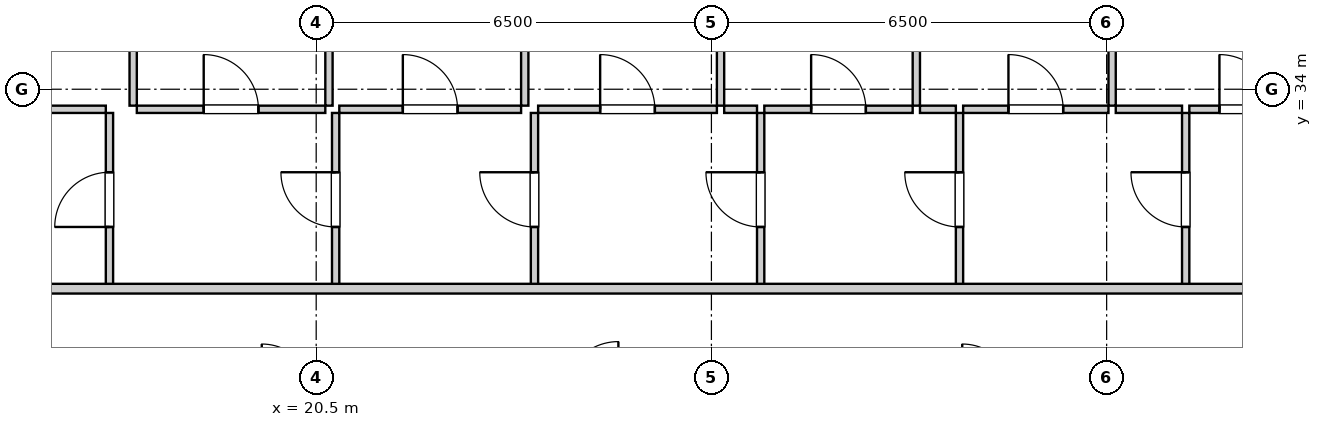
"""IFC4 building model, lengths in metres.
Left out: names, types, materials, properties, quantities, classifications, styles, units other than length and angle.
Written with IfcOpenShell. Run it as: python <this file> out.ifc"""

import sys

from ifc_helpers import new_model, si_unit, direction, frame, frame_2d, origin, place, context, subcontext, project, spatial, rectangle, extrude, element, fill, save


model = new_model("IFC4")
c1 = context("Model", 3, precision=1e-05, world=origin(), true_north=direction((0.0, 1.0)))
c2 = subcontext(c1, "Body", "Model", "MODEL_VIEW")
j1 = project(units=[si_unit("LENGTHUNIT", "METRE"), si_unit("PLANEANGLEUNIT", "RADIAN")], contexts=[c1])
p1 = place(None, origin())
s1 = spatial("IfcSite", under=j1, at=p1, CompositionType="ELEMENT")
p2 = place(p1, origin())
s2 = spatial("IfcBuilding", under=s1, at=p2, CompositionType="ELEMENT")
p3 = place(p2, frame((0.0, 0.0, 100.7)))
s3 = spatial("IfcBuildingStorey", under=s2, at=p3, CompositionType="ELEMENT", Elevation=100.7)
p4 = place(p3, frame((17.1, 30.76, 0.0), z_axis=(0.0, 0.0, 1.0), x_axis=(0.0, 1.0, 0.0)))
e1 = element("IfcWall", 1, at=p4, inside=s3, PredefinedType="PARTITIONING", context=c2, shape_type="SweptSolid", body=[
    extrude(rectangle(XDim=2.85, YDim=0.12, at=frame_2d((1.425, 0.0))), origin(), (0.0, 0.0, 1.0), 2.94),
])
p5 = place(p4, frame((0.975, 0.0, 0.0)))
e2 = element("IfcOpeningElement", 2, at=p5, cuts=e1, PredefinedType="OPENING", context=c2, shape_type="SweptSolid", body=[
    extrude(rectangle(XDim=0.9, YDim=2.05, at=frame_2d((0.45, 1.025))), frame((0.0, 0.07, 0.0), z_axis=(0.0, -1.0, 0.0), x_axis=(1.0, 0.0, 0.0)), (0.0, 0.0, 1.0), 0.14),
])
p6 = place(p3, frame((14.33, 33.67, 0.0), z_axis=(0.0, 0.0, 1.0), x_axis=(1.0, 0.0, 0.0)))
e3 = element("IfcWall", 3, at=p6, inside=s3, PredefinedType="PARTITIONING", context=c2, shape_type="SweptSolid", body=[
    extrude(rectangle(XDim=2.71, YDim=0.12, at=frame_2d((1.355, 0.0))), origin(), (0.0, 0.0, 1.0), 2.94),
])
p7 = place(p6, frame((0.905, 0.0, 0.0)))
e4 = element("IfcOpeningElement", 4, at=p7, cuts=e3, PredefinedType="OPENING", context=c2, shape_type="SweptSolid", body=[
    extrude(rectangle(XDim=0.9, YDim=2.05, at=frame_2d((0.45, 1.025))), frame((0.0, 0.07, 0.0), z_axis=(0.0, -1.0, 0.0), x_axis=(1.0, 0.0, 0.0)), (0.0, 0.0, 1.0), 0.14),
])
p8 = place(p3, frame((20.82, 30.76, 0.0), z_axis=(0.0, 0.0, 1.0), x_axis=(0.0, 1.0, 0.0)))
e5 = element("IfcWall", 5, at=p8, inside=s3, PredefinedType="PARTITIONING", context=c2, shape_type="SweptSolid", body=[
    extrude(rectangle(XDim=2.85, YDim=0.12, at=frame_2d((1.425, 0.0))), origin(), (0.0, 0.0, 1.0), 2.94),
])
p9 = place(p8, frame((0.975, 0.0, 0.0)))
e6 = element("IfcOpeningElement", 6, at=p9, cuts=e5, PredefinedType="OPENING", context=c2, shape_type="SweptSolid", body=[
    extrude(rectangle(XDim=0.9, YDim=2.05, at=frame_2d((0.45, 1.025))), frame((0.0, 0.07, 0.0), z_axis=(0.0, -1.0, 0.0), x_axis=(1.0, 0.0, 0.0)), (0.0, 0.0, 1.0), 0.14),
])
p10 = place(p3, frame((17.55, 33.67, 0.0), z_axis=(0.0, 0.0, 1.0), x_axis=(1.0, 0.0, 0.0)))
e7 = element("IfcWall", 7, at=p10, inside=s3, PredefinedType="PARTITIONING", context=c2, shape_type="SweptSolid", body=[
    extrude(rectangle(XDim=3.1, YDim=0.12, at=frame_2d((1.55, 0.0))), origin(), (0.0, 0.0, 1.0), 2.94),
])
p11 = place(p10, frame((1.1, 0.0, 0.0)))
e8 = element("IfcOpeningElement", 8, at=p11, cuts=e7, PredefinedType="OPENING", context=c2, shape_type="SweptSolid", body=[
    extrude(rectangle(XDim=0.9, YDim=2.05, at=frame_2d((0.45, 1.025))), frame((0.0, 0.07, 0.0), z_axis=(0.0, -1.0, 0.0), x_axis=(1.0, 0.0, 0.0)), (0.0, 0.0, 1.0), 0.14),
])
p12 = place(p3, frame((24.09, 30.76, 0.0), z_axis=(0.0, 0.0, 1.0), x_axis=(0.0, 1.0, 0.0)))
e9 = element("IfcWall", 9, at=p12, inside=s3, PredefinedType="PARTITIONING", context=c2, shape_type="SweptSolid", body=[
    extrude(rectangle(XDim=2.85, YDim=0.12, at=frame_2d((1.425, 0.0))), origin(), (0.0, 0.0, 1.0), 2.94),
])
p13 = place(p12, frame((0.975, 0.0, 0.0)))
e10 = element("IfcOpeningElement", 10, at=p13, cuts=e9, PredefinedType="OPENING", context=c2, shape_type="SweptSolid", body=[
    extrude(rectangle(XDim=0.9, YDim=2.05, at=frame_2d((0.45, 1.025))), frame((0.0, 0.07, 0.0), z_axis=(0.0, -1.0, 0.0), x_axis=(1.0, 0.0, 0.0)), (0.0, 0.0, 1.0), 0.14),
])
p14 = place(p3, frame((20.88, 33.67, 0.0), z_axis=(0.0, 0.0, 1.0), x_axis=(1.0, 0.0, 0.0)))
e11 = element("IfcWall", 11, at=p14, inside=s3, PredefinedType="PARTITIONING", context=c2, shape_type="SweptSolid", body=[
    extrude(rectangle(XDim=2.99, YDim=0.12, at=frame_2d((1.495, 0.0))), origin(), (0.0, 0.0, 1.0), 2.94),
])
p15 = place(p14, frame((1.045, 0.0, 0.0)))
e12 = element("IfcOpeningElement", 12, at=p15, cuts=e11, PredefinedType="OPENING", context=c2, shape_type="SweptSolid", body=[
    extrude(rectangle(XDim=0.9, YDim=2.05, at=frame_2d((0.45, 1.025))), frame((0.0, 0.07, 0.0), z_axis=(0.0, -1.0, 0.0), x_axis=(1.0, 0.0, 0.0)), (0.0, 0.0, 1.0), 0.14),
])
p16 = place(p3, frame((27.81, 30.76, 0.0), z_axis=(0.0, 0.0, 1.0), x_axis=(0.0, 1.0, 0.0)))
e13 = element("IfcWall", 13, at=p16, inside=s3, PredefinedType="PARTITIONING", context=c2, shape_type="SweptSolid", body=[
    extrude(rectangle(XDim=2.85, YDim=0.12, at=frame_2d((1.425, 0.0))), origin(), (0.0, 0.0, 1.0), 2.94),
])
p17 = place(p16, frame((0.975, 0.0, 0.0)))
e14 = element("IfcOpeningElement", 14, at=p17, cuts=e13, PredefinedType="OPENING", context=c2, shape_type="SweptSolid", body=[
    extrude(rectangle(XDim=0.9, YDim=2.05, at=frame_2d((0.45, 1.025))), frame((0.0, 0.07, 0.0), z_axis=(0.0, -1.0, 0.0), x_axis=(1.0, 0.0, 0.0)), (0.0, 0.0, 1.0), 0.14),
])
p18 = place(p3, frame((24.15, 33.67, 0.0), z_axis=(0.0, 0.0, 1.0), x_axis=(1.0, 0.0, 0.0)))
e15 = element("IfcWall", 15, at=p18, inside=s3, PredefinedType="PARTITIONING", context=c2, shape_type="SweptSolid", body=[
    extrude(rectangle(XDim=2.94, YDim=0.12, at=frame_2d((1.47, 0.0))), origin(), (0.0, 0.0, 1.0), 2.94),
])
p19 = place(p18, frame((1.02, 0.0, 0.0)))
e16 = element("IfcOpeningElement", 16, at=p19, cuts=e15, PredefinedType="OPENING", context=c2, shape_type="SweptSolid", body=[
    extrude(rectangle(XDim=0.9, YDim=2.05, at=frame_2d((0.45, 1.025))), frame((0.0, 0.07, 0.0), z_axis=(0.0, -1.0, 0.0), x_axis=(1.0, 0.0, 0.0)), (0.0, 0.0, 1.0), 0.14),
])
p20 = place(p3, frame((27.21, 33.67, 0.0), z_axis=(0.0, 0.0, 1.0), x_axis=(1.0, 0.0, 0.0)))
e17 = element("IfcWall", 17, at=p20, inside=s3, PredefinedType="PARTITIONING", context=c2, shape_type="SweptSolid", body=[
    extrude(rectangle(XDim=0.54, YDim=0.12, at=frame_2d((0.27, 0.0))), origin(), (0.0, 0.0, 1.0), 2.94),
])
p21 = place(p3, frame((31.08, 30.76, 0.0), z_axis=(0.0, 0.0, 1.0), x_axis=(0.0, 1.0, 0.0)))
e18 = element("IfcWall", 18, at=p21, inside=s3, PredefinedType="PARTITIONING", context=c2, shape_type="SweptSolid", body=[
    extrude(rectangle(XDim=2.85, YDim=0.12, at=frame_2d((1.425, 0.0))), origin(), (0.0, 0.0, 1.0), 2.94),
])
p22 = place(p21, frame((0.975, 0.0, 0.0)))
e19 = element("IfcOpeningElement", 19, at=p22, cuts=e18, PredefinedType="OPENING", context=c2, shape_type="SweptSolid", body=[
    extrude(rectangle(XDim=0.9, YDim=2.05, at=frame_2d((0.45, 1.025))), frame((0.0, 0.07, 0.0), z_axis=(0.0, -1.0, 0.0), x_axis=(1.0, 0.0, 0.0)), (0.0, 0.0, 1.0), 0.14),
])
p23 = place(p3, frame((27.87, 33.67, 0.0), z_axis=(0.0, 0.0, 1.0), x_axis=(1.0, 0.0, 0.0)))
e20 = element("IfcWall", 20, at=p23, inside=s3, PredefinedType="PARTITIONING", context=c2, shape_type="SweptSolid", body=[
    extrude(rectangle(XDim=2.44, YDim=0.12, at=frame_2d((1.22, 0.0))), origin(), (0.0, 0.0, 1.0), 2.94),
])
p24 = place(p23, frame((0.77, 0.0, 0.0)))
e21 = element("IfcOpeningElement", 21, at=p24, cuts=e20, PredefinedType="OPENING", context=c2, shape_type="SweptSolid", body=[
    extrude(rectangle(XDim=0.9, YDim=2.05, at=frame_2d((0.45, 1.025))), frame((0.0, 0.07, 0.0), z_axis=(0.0, -1.0, 0.0), x_axis=(1.0, 0.0, 0.0)), (0.0, 0.0, 1.0), 0.14),
])
p25 = place(p3, frame((30.43, 33.67, 0.0), z_axis=(0.0, 0.0, 1.0), x_axis=(1.0, 0.0, 0.0)))
e22 = element("IfcWall", 22, at=p25, inside=s3, PredefinedType="PARTITIONING", context=c2, shape_type="SweptSolid", body=[
    extrude(rectangle(XDim=0.59, YDim=0.12, at=frame_2d((0.295, 0.0))), origin(), (0.0, 0.0, 1.0), 2.94),
])
p26 = place(p3, frame((34.8, 30.76, 0.0), z_axis=(0.0, 0.0, 1.0), x_axis=(0.0, 1.0, 0.0)))
e23 = element("IfcWall", 23, at=p26, inside=s3, PredefinedType="PARTITIONING", context=c2, shape_type="SweptSolid", body=[
    extrude(rectangle(XDim=2.85, YDim=0.12, at=frame_2d((1.425, 0.0))), origin(), (0.0, 0.0, 1.0), 2.94),
])
p27 = place(p26, frame((0.975, 0.0, 0.0)))
e24 = element("IfcOpeningElement", 24, at=p27, cuts=e23, PredefinedType="OPENING", context=c2, shape_type="SweptSolid", body=[
    extrude(rectangle(XDim=0.9, YDim=2.05, at=frame_2d((0.45, 1.025))), frame((0.0, 0.07, 0.0), z_axis=(0.0, -1.0, 0.0), x_axis=(1.0, 0.0, 0.0)), (0.0, 0.0, 1.0), 0.14),
])
p28 = place(p3, frame((31.14, 33.67, 0.0), z_axis=(0.0, 0.0, 1.0), x_axis=(1.0, 0.0, 0.0)))
e25 = element("IfcWall", 25, at=p28, inside=s3, PredefinedType="PARTITIONING", context=c2, shape_type="SweptSolid", body=[
    extrude(rectangle(XDim=2.39, YDim=0.12, at=frame_2d((1.195, 0.0))), origin(), (0.0, 0.0, 1.0), 2.94),
])
p29 = place(p28, frame((0.745, 0.0, 0.0)))
e26 = element("IfcOpeningElement", 26, at=p29, cuts=e25, PredefinedType="OPENING", context=c2, shape_type="SweptSolid", body=[
    extrude(rectangle(XDim=0.9, YDim=2.05, at=frame_2d((0.45, 1.025))), frame((0.0, 0.07, 0.0), z_axis=(0.0, -1.0, 0.0), x_axis=(1.0, 0.0, 0.0)), (0.0, 0.0, 1.0), 0.14),
])
p30 = place(p3, frame((33.65, 33.67, 0.0), z_axis=(0.0, 0.0, 1.0), x_axis=(1.0, 0.0, 0.0)))
e27 = element("IfcWall", 27, at=p30, inside=s3, PredefinedType="PARTITIONING", context=c2, shape_type="SweptSolid", body=[
    extrude(rectangle(XDim=1.09, YDim=0.12, at=frame_2d((0.545, 0.0))), origin(), (0.0, 0.0, 1.0), 2.94),
])
p31 = place(p3, frame((34.86, 33.67, 0.0), z_axis=(0.0, 0.0, 1.0), x_axis=(1.0, 0.0, 0.0)))
e28 = element("IfcWall", 28, at=p31, inside=s3, PredefinedType="PARTITIONING", context=c2, shape_type="SweptSolid", body=[
    extrude(rectangle(XDim=1.89, YDim=0.12, at=frame_2d((0.945, 0.0))), origin(), (0.0, 0.0, 1.0), 2.94),
])
p32 = place(p31, frame((0.495, 0.0, 0.0)))
e29 = element("IfcOpeningElement", 29, at=p32, cuts=e28, PredefinedType="OPENING", context=c2, shape_type="SweptSolid", body=[
    extrude(rectangle(XDim=0.9, YDim=2.05, at=frame_2d((0.45, 1.025))), frame((0.0, 0.07, 0.0), z_axis=(0.0, -1.0, 0.0), x_axis=(1.0, 0.0, 0.0)), (0.0, 0.0, 1.0), 0.14),
])
p33 = place(p3, frame((17.49, 33.73, 0.0), z_axis=(0.0, 0.0, 1.0), x_axis=(0.0, 1.0, 0.0)))
e30 = element("IfcWall", 30, at=p33, inside=s3, PredefinedType="PARTITIONING", context=c2, shape_type="SweptSolid", body=[
    extrude(rectangle(XDim=9.29, YDim=0.12, at=frame_2d((4.645, 0.0))), origin(), (0.0, 0.0, 1.0), 2.94),
])
p34 = place(p33, frame((4.18, 0.0, 0.0)))
e31 = element("IfcOpeningElement", 31, at=p34, cuts=e30, PredefinedType="OPENING", context=c2, shape_type="SweptSolid", body=[
    extrude(rectangle(XDim=0.9, YDim=2.05, at=frame_2d((0.45, 1.025))), frame((0.0, 0.07, 0.0), z_axis=(0.0, -1.0, 0.0), x_axis=(1.0, 0.0, 0.0)), (0.0, 0.0, 1.0), 0.14),
])
p35 = place(p3, frame((20.71, 33.73, 0.0), z_axis=(0.0, 0.0, 1.0), x_axis=(0.0, 1.0, 0.0)))
e32 = element("IfcWall", 32, at=p35, inside=s3, PredefinedType="PARTITIONING", context=c2, shape_type="SweptSolid", body=[
    extrude(rectangle(XDim=9.29, YDim=0.12, at=frame_2d((4.645, 0.0))), origin(), (0.0, 0.0, 1.0), 2.94),
])
p36 = place(p35, frame((4.18, 0.0, 0.0)))
e33 = element("IfcOpeningElement", 33, at=p36, cuts=e32, PredefinedType="OPENING", context=c2, shape_type="SweptSolid", body=[
    extrude(rectangle(XDim=0.9, YDim=2.05, at=frame_2d((0.45, 1.025))), frame((0.0, 0.07, 0.0), z_axis=(0.0, -1.0, 0.0), x_axis=(1.0, 0.0, 0.0)), (0.0, 0.0, 1.0), 0.14),
])
p37 = place(p3, frame((23.93, 33.73, 0.0), z_axis=(0.0, 0.0, 1.0), x_axis=(0.0, 1.0, 0.0)))
e34 = element("IfcWall", 34, at=p37, inside=s3, PredefinedType="PARTITIONING", context=c2, shape_type="SweptSolid", body=[
    extrude(rectangle(XDim=9.29, YDim=0.12, at=frame_2d((4.645, 0.0))), origin(), (0.0, 0.0, 1.0), 2.94),
])
p38 = place(p37, frame((4.18, 0.0, 0.0)))
e35 = element("IfcOpeningElement", 35, at=p38, cuts=e34, PredefinedType="OPENING", context=c2, shape_type="SweptSolid", body=[
    extrude(rectangle(XDim=0.9, YDim=2.05, at=frame_2d((0.45, 1.025))), frame((0.0, 0.07, 0.0), z_axis=(0.0, -1.0, 0.0), x_axis=(1.0, 0.0, 0.0)), (0.0, 0.0, 1.0), 0.14),
])
p39 = place(p3, frame((27.15, 33.73, 0.0), z_axis=(0.0, 0.0, 1.0), x_axis=(0.0, 1.0, 0.0)))
e36 = element("IfcWall", 36, at=p39, inside=s3, PredefinedType="PARTITIONING", context=c2, shape_type="SweptSolid", body=[
    extrude(rectangle(XDim=9.29, YDim=0.12, at=frame_2d((4.645, 0.0))), origin(), (0.0, 0.0, 1.0), 2.94),
])
p40 = place(p39, frame((4.18, 0.0, 0.0)))
e37 = element("IfcOpeningElement", 37, at=p40, cuts=e36, PredefinedType="OPENING", context=c2, shape_type="SweptSolid", body=[
    extrude(rectangle(XDim=0.9, YDim=2.05, at=frame_2d((0.45, 1.025))), frame((0.0, 0.07, 0.0), z_axis=(0.0, -1.0, 0.0), x_axis=(1.0, 0.0, 0.0)), (0.0, 0.0, 1.0), 0.14),
])
p41 = place(p3, frame((30.37, 33.73, 0.0), z_axis=(0.0, 0.0, 1.0), x_axis=(0.0, 1.0, 0.0)))
e38 = element("IfcWall", 38, at=p41, inside=s3, PredefinedType="PARTITIONING", context=c2, shape_type="SweptSolid", body=[
    extrude(rectangle(XDim=9.29, YDim=0.12, at=frame_2d((4.645, 0.0))), origin(), (0.0, 0.0, 1.0), 2.94),
])
p42 = place(p41, frame((4.18, 0.0, 0.0)))
e39 = element("IfcOpeningElement", 39, at=p42, cuts=e38, PredefinedType="OPENING", context=c2, shape_type="SweptSolid", body=[
    extrude(rectangle(XDim=0.9, YDim=2.05, at=frame_2d((0.45, 1.025))), frame((0.0, 0.07, 0.0), z_axis=(0.0, -1.0, 0.0), x_axis=(1.0, 0.0, 0.0)), (0.0, 0.0, 1.0), 0.14),
])
p43 = place(p3, frame((33.59, 33.73, 0.0), z_axis=(0.0, 0.0, 1.0), x_axis=(0.0, 1.0, 0.0)))
e40 = element("IfcWall", 40, at=p43, inside=s3, PredefinedType="PARTITIONING", context=c2, shape_type="SweptSolid", body=[
    extrude(rectangle(XDim=9.29, YDim=0.12, at=frame_2d((4.645, 0.0))), origin(), (0.0, 0.0, 1.0), 2.94),
])
p44 = place(p43, frame((4.18, 0.0, 0.0)))
e41 = element("IfcOpeningElement", 41, at=p44, cuts=e40, PredefinedType="OPENING", context=c2, shape_type="SweptSolid", body=[
    extrude(rectangle(XDim=0.9, YDim=2.05, at=frame_2d((0.45, 1.025))), frame((0.0, 0.07, 0.0), z_axis=(0.0, -1.0, 0.0), x_axis=(1.0, 0.0, 0.0)), (0.0, 0.0, 1.0), 0.14),
])
p45 = place(p3, frame((10.05, 30.72, 0.0), z_axis=(0.0, 0.0, 1.0), x_axis=(1.0, 0.0, 0.0)))
e42 = element("IfcWall", 42, at=p45, inside=s3, PredefinedType="PARTITIONING", context=c2, shape_type="SweptSolid", body=[
    extrude(rectangle(XDim=30.8, YDim=0.16, at=frame_2d((15.4, 0.0))), origin(), (0.0, 0.0, 1.0), 2.94),
])
p46 = place(p45, frame((4.295, 0.0, 0.0)))
e43 = element("IfcOpeningElement", 43, at=p46, cuts=e42, PredefinedType="OPENING", context=c2, shape_type="SweptSolid", body=[
    extrude(rectangle(XDim=0.95, YDim=2.1, at=frame_2d((0.475, 1.05))), frame((0.0, 0.09, 0.0), z_axis=(0.0, -1.0, 0.0), x_axis=(1.0, 0.0, 0.0)), (0.0, 0.0, 1.0), 0.18),
])
p47 = place(p5, origin())
e44 = element("IfcDoor", 44, at=p47, inside=s3, OperationType="SINGLE_SWING_LEFT", PredefinedType="DOOR", context=c2, shape_type="SweptSolid", body=[
    extrude(rectangle(XDim=0.9, YDim=2.05, at=frame_2d((0.45, 1.025))), frame((0.0, 0.025, 0.0), z_axis=(0.0, -1.0, 0.0), x_axis=(1.0, 0.0, 0.0)), (0.0, 0.0, 1.0), 0.05),
])
fill(e2, e44)
p48 = place(p9, origin())
e45 = element("IfcDoor", 45, at=p48, inside=s3, OperationType="SINGLE_SWING_RIGHT", PredefinedType="DOOR", context=c2, shape_type="SweptSolid", body=[
    extrude(rectangle(XDim=0.9, YDim=2.05, at=frame_2d((0.45, 1.025))), frame((0.0, 0.025, 0.0), z_axis=(0.0, -1.0, 0.0), x_axis=(1.0, 0.0, 0.0)), (0.0, 0.0, 1.0), 0.05),
])
fill(e6, e45)
p49 = place(p11, origin())
e46 = element("IfcDoor", 46, at=p49, inside=s3, OperationType="SINGLE_SWING_LEFT", PredefinedType="DOOR", context=c2, shape_type="SweptSolid", body=[
    extrude(rectangle(XDim=0.9, YDim=2.05, at=frame_2d((0.45, 1.025))), frame((0.0, 0.025, 0.0), z_axis=(0.0, -1.0, 0.0), x_axis=(1.0, 0.0, 0.0)), (0.0, 0.0, 1.0), 0.05),
])
fill(e8, e46)
p50 = place(p13, origin())
e47 = element("IfcDoor", 47, at=p50, inside=s3, OperationType="SINGLE_SWING_RIGHT", PredefinedType="DOOR", context=c2, shape_type="SweptSolid", body=[
    extrude(rectangle(XDim=0.9, YDim=2.05, at=frame_2d((0.45, 1.025))), frame((0.0, 0.025, 0.0), z_axis=(0.0, -1.0, 0.0), x_axis=(1.0, 0.0, 0.0)), (0.0, 0.0, 1.0), 0.05),
])
fill(e10, e47)
p51 = place(p15, origin())
e48 = element("IfcDoor", 48, at=p51, inside=s3, OperationType="SINGLE_SWING_LEFT", PredefinedType="DOOR", context=c2, shape_type="SweptSolid", body=[
    extrude(rectangle(XDim=0.9, YDim=2.05, at=frame_2d((0.45, 1.025))), frame((0.0, 0.025, 0.0), z_axis=(0.0, -1.0, 0.0), x_axis=(1.0, 0.0, 0.0)), (0.0, 0.0, 1.0), 0.05),
])
fill(e12, e48)
p52 = place(p17, origin())
e49 = element("IfcDoor", 49, at=p52, inside=s3, OperationType="SINGLE_SWING_RIGHT", PredefinedType="DOOR", context=c2, shape_type="SweptSolid", body=[
    extrude(rectangle(XDim=0.9, YDim=2.05, at=frame_2d((0.45, 1.025))), frame((0.0, 0.025, 0.0), z_axis=(0.0, -1.0, 0.0), x_axis=(1.0, 0.0, 0.0)), (0.0, 0.0, 1.0), 0.05),
])
fill(e14, e49)
p53 = place(p19, origin())
e50 = element("IfcDoor", 50, at=p53, inside=s3, OperationType="SINGLE_SWING_LEFT", PredefinedType="DOOR", context=c2, shape_type="SweptSolid", body=[
    extrude(rectangle(XDim=0.9, YDim=2.05, at=frame_2d((0.45, 1.025))), frame((0.0, 0.025, 0.0), z_axis=(0.0, -1.0, 0.0), x_axis=(1.0, 0.0, 0.0)), (0.0, 0.0, 1.0), 0.05),
])
fill(e16, e50)
p54 = place(p22, origin())
e51 = element("IfcDoor", 51, at=p54, inside=s3, OperationType="SINGLE_SWING_RIGHT", PredefinedType="DOOR", context=c2, shape_type="SweptSolid", body=[
    extrude(rectangle(XDim=0.9, YDim=2.05, at=frame_2d((0.45, 1.025))), frame((0.0, 0.025, 0.0), z_axis=(0.0, -1.0, 0.0), x_axis=(1.0, 0.0, 0.0)), (0.0, 0.0, 1.0), 0.05),
])
fill(e19, e51)
p55 = place(p24, origin())
e52 = element("IfcDoor", 52, at=p55, inside=s3, OperationType="SINGLE_SWING_LEFT", PredefinedType="DOOR", context=c2, shape_type="SweptSolid", body=[
    extrude(rectangle(XDim=0.9, YDim=2.05, at=frame_2d((0.45, 1.025))), frame((0.0, 0.025, 0.0), z_axis=(0.0, -1.0, 0.0), x_axis=(1.0, 0.0, 0.0)), (0.0, 0.0, 1.0), 0.05),
])
fill(e21, e52)
p56 = place(p27, origin())
e53 = element("IfcDoor", 53, at=p56, inside=s3, OperationType="SINGLE_SWING_RIGHT", PredefinedType="DOOR", context=c2, shape_type="SweptSolid", body=[
    extrude(rectangle(XDim=0.9, YDim=2.05, at=frame_2d((0.45, 1.025))), frame((0.0, 0.025, 0.0), z_axis=(0.0, -1.0, 0.0), x_axis=(1.0, 0.0, 0.0)), (0.0, 0.0, 1.0), 0.05),
])
fill(e24, e53)
p57 = place(p29, origin())
e54 = element("IfcDoor", 54, at=p57, inside=s3, OperationType="SINGLE_SWING_LEFT", PredefinedType="DOOR", context=c2, shape_type="SweptSolid", body=[
    extrude(rectangle(XDim=0.9, YDim=2.05, at=frame_2d((0.45, 1.025))), frame((0.0, 0.025, 0.0), z_axis=(0.0, -1.0, 0.0), x_axis=(1.0, 0.0, 0.0)), (0.0, 0.0, 1.0), 0.05),
])
fill(e26, e54)
p58 = place(p32, origin())
e55 = element("IfcDoor", 55, at=p58, inside=s3, OperationType="SINGLE_SWING_LEFT", PredefinedType="DOOR", context=c2, shape_type="SweptSolid", body=[
    extrude(rectangle(XDim=0.9, YDim=2.05, at=frame_2d((0.45, 1.025))), frame((0.0, 0.025, 0.0), z_axis=(0.0, -1.0, 0.0), x_axis=(1.0, 0.0, 0.0)), (0.0, 0.0, 1.0), 0.05),
])
fill(e29, e55)
save(model, sys.argv[1])
